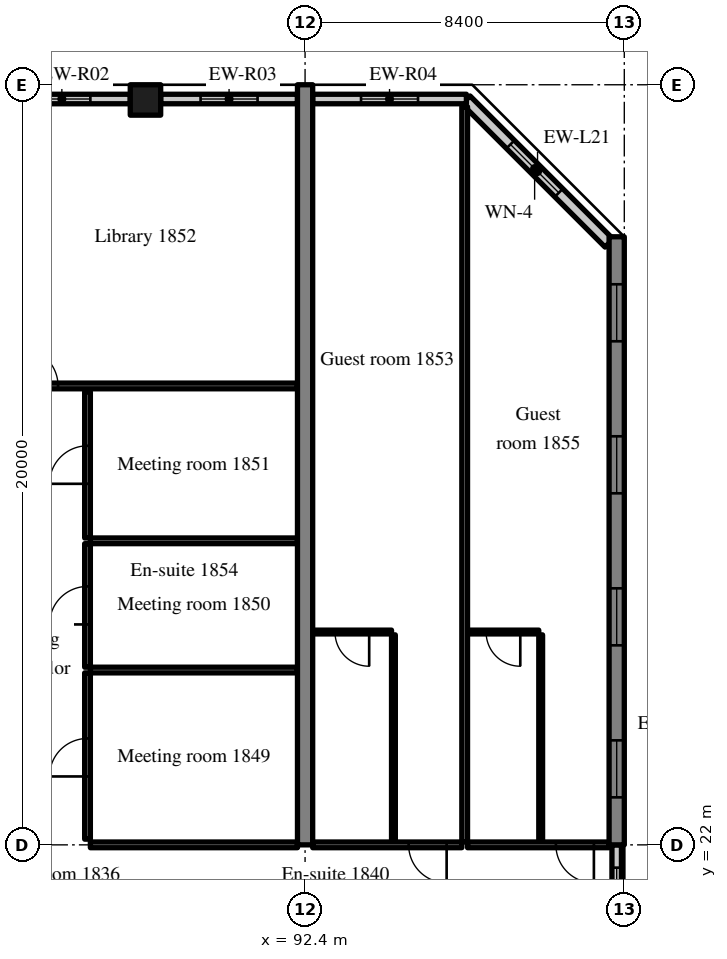
"""IFC4 building model, lengths in metres.
Left out: names, types, materials, properties, quantities, classifications, styles, units other than length and angle.
Written with IfcOpenShell. Run it as: python <this file> out.ifc"""

import sys

from ifc_helpers import new_model, si_unit, direction, frame, frame_2d, origin, origin_2d, place, context, subcontext, project, spatial, rectangle, extrude, source, transform, mapped, element, fill, save


model = new_model("IFC4")
c1 = context("Model", 3, precision=1e-05, world=origin(), true_north=direction((0.0, 1.0)))
c2 = subcontext(c1, "Body", "Model", "MODEL_VIEW")
j1 = project(units=[si_unit("LENGTHUNIT", "METRE"), si_unit("PLANEANGLEUNIT", "RADIAN")], contexts=[c1])
p1 = place(None, origin())
s1 = spatial("IfcSite", under=j1, at=p1, CompositionType="ELEMENT")
p2 = place(p1, origin())
s2 = spatial("IfcBuilding", under=s1, at=p2, CompositionType="ELEMENT")
p3 = place(p2, frame((0.0, 0.0, 77.2)))
s3 = spatial("IfcBuildingStorey", under=s2, at=p3, CompositionType="ELEMENT", Elevation=77.2)
m1 = source(origin(), c2, "Body", "SweptSolid", [
    extrude(rectangle(XDim=20.0, YDim=0.4, at=frame_2d((10.0, 0.0))), origin(), (0.0, 0.0, 1.0), 3.52),
])
p4 = place(p3, frame((92.4, 22.0, 0.0), z_axis=(0.0, 0.0, 1.0), x_axis=(0.0, 1.0, 0.0)))
e1 = element("IfcWall", 1, at=p4, inside=s3, PredefinedType="SHEAR", context=c2, shape_type="MappedRepresentation", body=[
    mapped(m1, transform((0.0, 0.0, 0.0), scale=1.0)),
])
m2 = source(origin(), c2, "Body", "SweptSolid", [
    extrude(rectangle(XDim=16.0, YDim=0.4, at=frame_2d((8.0, 0.0))), origin(), (0.0, 0.0, 1.0), 3.52),
])
p5 = place(p3, frame((100.6, 22.0, 0.0), z_axis=(0.0, 0.0, 1.0), x_axis=(0.0, 1.0, 0.0)))
e2 = element("IfcWall", 2, at=p5, inside=s3, PredefinedType="SHEAR", context=c2, shape_type="MappedRepresentation", body=[
    mapped(m2, transform((0.0, 0.0, 0.0), scale=1.0)),
])
m3 = source(origin(), c2, "Body", "SweptSolid", [
    extrude(rectangle(XDim=1.5, YDim=1.5, at=frame_2d((0.75, 0.75))), frame((0.0, 0.21, 0.0), z_axis=(0.0, -1.0, 0.0), x_axis=(1.0, 0.0, 0.0)), (0.0, 0.0, 1.0), 0.42),
])
p6 = place(p5, frame((1.25, 0.0, 0.9)))
e3 = element("IfcOpeningElement", 3, at=p6, cuts=e2, PredefinedType="OPENING", context=c2, shape_type="MappedRepresentation", body=[
    mapped(m3, transform((0.0, 0.0, 0.0), scale=1.0)),
])
p7 = place(p5, frame((5.25, 0.0, 0.9)))
e4 = element("IfcOpeningElement", 4, at=p7, cuts=e2, PredefinedType="OPENING", context=c2, shape_type="MappedRepresentation", body=[
    mapped(m3, transform((0.0, 0.0, 0.0), scale=1.0)),
])
p8 = place(p5, frame((9.25, 0.0, 0.9)))
e5 = element("IfcOpeningElement", 5, at=p8, cuts=e2, PredefinedType="OPENING", context=c2, shape_type="MappedRepresentation", body=[
    mapped(m3, transform((0.0, 0.0, 0.0), scale=1.0)),
])
p9 = place(p5, frame((13.25, 0.0, 0.9)))
e6 = element("IfcOpeningElement", 6, at=p9, cuts=e2, PredefinedType="OPENING", context=c2, shape_type="MappedRepresentation", body=[
    mapped(m3, transform((0.0, 0.0, 0.0), scale=1.0)),
])
m4 = source(origin(), c2, "Body", "SweptSolid", [
    extrude(rectangle(XDim=0.8, YDim=0.8, at=origin_2d()), origin(), (0.0, 0.0, 1.0), 3.52),
])
p10 = place(p3, frame((88.2, 41.6, 0.0), z_axis=(0.0, 0.0, 1.0), x_axis=(1.0, 0.0, 0.0)))
e7 = element("IfcColumn", 7, at=p10, inside=s3, PredefinedType="COLUMN", context=c2, shape_type="MappedRepresentation", body=[
    mapped(m4, transform((0.0, 0.0, 0.0), scale=1.0)),
])
m5 = source(origin(), c2, "Body", "SweptSolid", [
    extrude(rectangle(XDim=5.326, YDim=0.3, at=frame_2d((2.663, 0.0))), origin(), (0.0, 0.0, 1.0), 3.52),
])
p11 = place(p3, frame((100.4, 37.834, 0.0), z_axis=(0.0, 0.0, 1.0), x_axis=(-0.707083859269, 0.707129702361, 0.0)))
e8 = element("IfcWall", 8, at=p11, inside=s3, PredefinedType="SOLIDWALL", context=c2, shape_type="MappedRepresentation", body=[
    mapped(m5, transform((0.0, 0.0, 0.0), scale=1.0)),
])
m6 = source(origin(), c2, "Body", "SweptSolid", [
    extrude(rectangle(XDim=1.8, YDim=1.5, at=frame_2d((0.9, 0.75))), frame((0.0, 0.16, 0.0), z_axis=(0.0, -1.0, 0.0), x_axis=(1.0, 0.0, 0.0)), (0.0, 0.0, 1.0), 0.32),
])
p12 = place(p11, frame((1.871, 0.0, 0.9)))
e9 = element("IfcOpeningElement", 9, at=p12, cuts=e8, PredefinedType="OPENING", context=c2, shape_type="MappedRepresentation", body=[
    mapped(m6, transform((0.0, 0.0, 0.0), scale=1.0)),
])
m7 = source(origin(), c2, "Body", "SweptSolid", [
    extrude(rectangle(XDim=3.6, YDim=0.25, at=frame_2d((1.8, 0.0))), origin(), (0.0, 0.0, 1.0), 2.82),
])
p13 = place(p3, frame((87.8, 41.625, 0.0), z_axis=(0.0, 0.0, 1.0), x_axis=(-1.0, 0.0, 0.0)))
e10 = element("IfcWall", 10, at=p13, inside=s3, PredefinedType="SOLIDWALL", context=c2, shape_type="MappedRepresentation", body=[
    mapped(m7, transform((0.0, 0.0, 0.0), scale=1.0)),
])
m8 = source(origin(), c2, "Body", "SweptSolid", [
    extrude(rectangle(XDim=1.5, YDim=1.5, at=frame_2d((0.75, 0.75))), frame((0.0, 0.135, 0.0), z_axis=(0.0, -1.0, 0.0), x_axis=(1.0, 0.0, 0.0)), (0.0, 0.0, 1.0), 0.27),
])
p14 = place(p13, frame((1.05, 0.0, 0.9)))
e11 = element("IfcOpeningElement", 11, at=p14, cuts=e10, PredefinedType="OPENING", context=c2, shape_type="MappedRepresentation", body=[
    mapped(m8, transform((0.0, 0.0, 0.0), scale=1.0)),
])
m9 = source(origin(), c2, "Body", "SweptSolid", [
    extrude(rectangle(XDim=3.6, YDim=0.25, at=frame_2d((1.8, 0.0))), origin(), (0.0, 0.0, 1.0), 2.82),
])
p15 = place(p3, frame((92.2, 41.625, 0.0), z_axis=(0.0, 0.0, 1.0), x_axis=(-1.0, 0.0, 0.0)))
e12 = element("IfcWall", 12, at=p15, inside=s3, PredefinedType="SOLIDWALL", context=c2, shape_type="MappedRepresentation", body=[
    mapped(m9, transform((0.0, 0.0, 0.0), scale=1.0)),
])
p16 = place(p15, frame((1.05, 0.0, 0.9)))
e13 = element("IfcOpeningElement", 13, at=p16, cuts=e12, PredefinedType="OPENING", context=c2, shape_type="MappedRepresentation", body=[
    mapped(m8, transform((0.0, 0.0, 0.0), scale=1.0)),
])
m10 = source(origin(), c2, "Body", "SweptSolid", [
    extrude(rectangle(XDim=4.045, YDim=0.25, at=frame_2d((2.022, 0.0))), origin(), (0.0, 0.0, 1.0), 2.82),
])
p17 = place(p3, frame((96.645, 41.625, 0.0), z_axis=(0.0, 0.0, 1.0), x_axis=(-1.0, 0.0, 0.0)))
e14 = element("IfcWall", 14, at=p17, inside=s3, PredefinedType="SOLIDWALL", context=c2, shape_type="MappedRepresentation", body=[
    mapped(m10, transform((0.0, 0.0, 0.0), scale=1.0)),
])
p18 = place(p17, frame((1.272, 0.0, 0.9)))
e15 = element("IfcOpeningElement", 15, at=p18, cuts=e14, PredefinedType="OPENING", context=c2, shape_type="MappedRepresentation", body=[
    mapped(m8, transform((0.0, 0.0, 0.0), scale=1.0)),
])
m11 = source(origin(), c2, "Body", "SweptSolid", [
    extrude(rectangle(XDim=2.4, YDim=0.25, at=frame_2d((1.2, 0.0))), origin(), (0.0, 0.0, 1.0), 2.62),
])
p19 = place(p3, frame((100.6, 19.6, 0.0), z_axis=(0.0, 0.0, 1.0), x_axis=(0.0, 1.0, 0.0)))
e16 = element("IfcWall", 16, at=p19, inside=s3, PredefinedType="SOLIDWALL", context=c2, shape_type="MappedRepresentation", body=[
    mapped(m11, transform((0.0, 0.0, 0.0), scale=1.0)),
])
m12 = source(origin(), c2, "Body", "SweptSolid", [
    extrude(rectangle(XDim=1.2, YDim=1.5, at=frame_2d((0.6, 0.75))), frame((0.0, 0.135, 0.0), z_axis=(0.0, -1.0, 0.0), x_axis=(1.0, 0.0, 0.0)), (0.0, 0.0, 1.0), 0.27),
])
p20 = place(p19, frame((0.6, 0.0, 0.9)))
e17 = element("IfcOpeningElement", 17, at=p20, cuts=e16, PredefinedType="OPENING", context=c2, shape_type="MappedRepresentation", body=[
    mapped(m12, transform((0.0, 0.0, 0.0), scale=1.0)),
])
m13 = source(origin(), c2, "Body", "SweptSolid", [
    extrude(rectangle(XDim=5.45, YDim=0.15, at=frame_2d((2.725, 0.0))), origin(), (0.0, 0.0, 1.0), 2.82),
])
p21 = place(p3, frame((86.75, 22.0, 0.0), z_axis=(0.0, 0.0, 1.0), x_axis=(1.0, 0.0, 0.0)))
e18 = element("IfcWall", 18, at=p21, inside=s3, PredefinedType="PARTITIONING", context=c2, shape_type="MappedRepresentation", body=[
    mapped(m13, transform((0.0, 0.0, 0.0), scale=1.0)),
])
m14 = source(origin(), c2, "Body", "SweptSolid", [
    extrude(rectangle(XDim=4.375, YDim=0.15, at=frame_2d((2.188, 0.0))), origin(), (0.0, 0.0, 1.0), 3.52),
])
p22 = place(p3, frame((86.675, 22.15, 0.0), z_axis=(0.0, 0.0, 1.0), x_axis=(0.0, 1.0, 0.0)))
e19 = element("IfcWall", 19, at=p22, inside=s3, PredefinedType="PARTITIONING", context=c2, shape_type="MappedRepresentation", body=[
    mapped(m14, transform((0.0, 0.0, 0.0), scale=1.0)),
])
m15 = source(origin(), c2, "Body", "SweptSolid", [
    extrude(rectangle(XDim=1.0, YDim=2.1, at=frame_2d((0.5, 1.05))), frame((0.0, 0.085, 0.0), z_axis=(0.0, -1.0, 0.0), x_axis=(1.0, 0.0, 0.0)), (0.0, 0.0, 1.0), 0.17),
])
p23 = place(p22, frame((1.65, 0.0, 0.0)))
e20 = element("IfcOpeningElement", 20, at=p23, cuts=e19, PredefinedType="OPENING", context=c2, shape_type="MappedRepresentation", body=[
    mapped(m15, transform((0.0, 0.0, 0.0), scale=1.0)),
])
m16 = source(origin(), c2, "Body", "SweptSolid", [
    extrude(rectangle(XDim=5.45, YDim=0.15, at=frame_2d((2.725, 0.0))), origin(), (0.0, 0.0, 1.0), 3.52),
])
p24 = place(p3, frame((86.75, 26.6, 0.0), z_axis=(0.0, 0.0, 1.0), x_axis=(1.0, 0.0, 0.0)))
e21 = element("IfcWall", 21, at=p24, inside=s3, PredefinedType="PARTITIONING", context=c2, shape_type="MappedRepresentation", body=[
    mapped(m16, transform((0.0, 0.0, 0.0), scale=1.0)),
])
m17 = source(origin(), c2, "Body", "SweptSolid", [
    extrude(rectangle(XDim=3.25, YDim=0.15, at=frame_2d((1.625, 0.0))), origin(), (0.0, 0.0, 1.0), 3.52),
])
p25 = place(p3, frame((86.675, 26.675, 0.0), z_axis=(0.0, 0.0, 1.0), x_axis=(0.0, 1.0, 0.0)))
e22 = element("IfcWall", 22, at=p25, inside=s3, PredefinedType="PARTITIONING", context=c2, shape_type="MappedRepresentation", body=[
    mapped(m17, transform((0.0, 0.0, 0.0), scale=1.0)),
])
p26 = place(p25, frame((1.125, 0.0, 0.0)))
e23 = element("IfcOpeningElement", 23, at=p26, cuts=e22, PredefinedType="OPENING", context=c2, shape_type="MappedRepresentation", body=[
    mapped(m15, transform((0.0, 0.0, 0.0), scale=1.0)),
])
p27 = place(p3, frame((86.75, 30.0, 0.0), z_axis=(0.0, 0.0, 1.0), x_axis=(1.0, 0.0, 0.0)))
e24 = element("IfcWall", 24, at=p27, inside=s3, PredefinedType="PARTITIONING", context=c2, shape_type="MappedRepresentation", body=[
    mapped(m16, transform((0.0, 0.0, 0.0), scale=1.0)),
])
m18 = source(origin(), c2, "Body", "SweptSolid", [
    extrude(rectangle(XDim=3.85, YDim=0.15, at=frame_2d((1.925, 0.0))), origin(), (0.0, 0.0, 1.0), 3.52),
])
p28 = place(p3, frame((86.675, 30.075, 0.0), z_axis=(0.0, 0.0, 1.0), x_axis=(0.0, 1.0, 0.0)))
e25 = element("IfcWall", 25, at=p28, inside=s3, PredefinedType="PARTITIONING", context=c2, shape_type="MappedRepresentation", body=[
    mapped(m18, transform((0.0, 0.0, 0.0), scale=1.0)),
])
p29 = place(p28, frame((1.425, 0.0, 0.0)))
e26 = element("IfcOpeningElement", 26, at=p29, cuts=e25, PredefinedType="OPENING", context=c2, shape_type="MappedRepresentation", body=[
    mapped(m15, transform((0.0, 0.0, 0.0), scale=1.0)),
])
m19 = source(origin(), c2, "Body", "SweptSolid", [
    extrude(rectangle(XDim=8.0, YDim=0.15, at=frame_2d((4.0, 0.0))), origin(), (0.0, 0.0, 1.0), 3.52),
])
p30 = place(p3, frame((84.2, 34.075, 0.0), z_axis=(0.0, 0.0, 1.0), x_axis=(1.0, 0.0, 0.0)))
e27 = element("IfcWall", 27, at=p30, inside=s3, PredefinedType="PARTITIONING", context=c2, shape_type="MappedRepresentation", body=[
    mapped(m19, transform((0.0, 0.0, 0.0), scale=1.0)),
])
p31 = place(p30, frame((0.7, 0.0, 0.0)))
e28 = element("IfcOpeningElement", 28, at=p31, cuts=e27, PredefinedType="OPENING", context=c2, shape_type="MappedRepresentation", body=[
    mapped(m15, transform((0.0, 0.0, 0.0), scale=1.0)),
])
m20 = source(origin(), c2, "Body", "SweptSolid", [
    extrude(rectangle(XDim=5.45, YDim=0.1, at=frame_2d((2.725, 0.0))), origin(), (0.0, 0.0, 1.0), 3.52),
])
p32 = place(p3, frame((94.725, 22.075, 0.0), z_axis=(0.0, 0.0, 1.0), x_axis=(0.0, 1.0, 0.0)))
e29 = element("IfcWall", 29, at=p32, inside=s3, PredefinedType="PARTITIONING", context=c2, shape_type="MappedRepresentation", body=[
    mapped(m20, transform((0.0, 0.0, 0.0), scale=1.0)),
])
m21 = source(origin(), c2, "Body", "SweptSolid", [
    extrude(rectangle(XDim=2.075, YDim=0.1, at=frame_2d((1.038, 0.0))), origin(), (0.0, 0.0, 1.0), 3.52),
])
p33 = place(p3, frame((92.6, 27.6, 0.0), z_axis=(0.0, 0.0, 1.0), x_axis=(1.0, 0.0, 0.0)))
e30 = element("IfcWall", 30, at=p33, inside=s3, PredefinedType="PARTITIONING", context=c2, shape_type="MappedRepresentation", body=[
    mapped(m21, transform((0.0, 0.0, 0.0), scale=1.0)),
])
m22 = source(origin(), c2, "Body", "SweptSolid", [
    extrude(rectangle(XDim=0.9, YDim=2.1, at=frame_2d((0.45, 1.05))), frame((0.0, 0.06, 0.0), z_axis=(0.0, -1.0, 0.0), x_axis=(1.0, 0.0, 0.0)), (0.0, 0.0, 1.0), 0.12),
])
p34 = place(p33, frame((0.587, 0.0, 0.0)))
e31 = element("IfcOpeningElement", 31, at=p34, cuts=e30, PredefinedType="OPENING", context=c2, shape_type="MappedRepresentation", body=[
    mapped(m22, transform((0.0, 0.0, 0.0), scale=1.0)),
])
m23 = source(origin(), c2, "Body", "SweptSolid", [
    extrude(rectangle(XDim=3.925, YDim=0.15, at=frame_2d((1.962, 0.0))), origin(), (0.0, 0.0, 1.0), 2.82),
])
p35 = place(p3, frame((92.6, 22.0, 0.0), z_axis=(0.0, 0.0, 1.0), x_axis=(1.0, 0.0, 0.0)))
e32 = element("IfcWall", 32, at=p35, inside=s3, PredefinedType="PARTITIONING", context=c2, shape_type="MappedRepresentation", body=[
    mapped(m23, transform((0.0, 0.0, 0.0), scale=1.0)),
])
p36 = place(p35, frame((2.525, 0.0, 0.0)))
e33 = element("IfcOpeningElement", 33, at=p36, cuts=e32, PredefinedType="OPENING", context=c2, shape_type="MappedRepresentation", body=[
    mapped(m15, transform((0.0, 0.0, 0.0), scale=1.0)),
])
p37 = place(p3, frame((98.6, 22.075, 0.0), z_axis=(0.0, 0.0, 1.0), x_axis=(0.0, 1.0, 0.0)))
e34 = element("IfcWall", 34, at=p37, inside=s3, PredefinedType="PARTITIONING", context=c2, shape_type="MappedRepresentation", body=[
    mapped(m20, transform((0.0, 0.0, 0.0), scale=1.0)),
])
m24 = source(origin(), c2, "Body", "SweptSolid", [
    extrude(rectangle(XDim=1.875, YDim=0.1, at=frame_2d((0.938, 0.0))), origin(), (0.0, 0.0, 1.0), 3.52),
])
p38 = place(p3, frame((96.675, 27.6, 0.0), z_axis=(0.0, 0.0, 1.0), x_axis=(1.0, 0.0, 0.0)))
e35 = element("IfcWall", 35, at=p38, inside=s3, PredefinedType="PARTITIONING", context=c2, shape_type="MappedRepresentation", body=[
    mapped(m24, transform((0.0, 0.0, 0.0), scale=1.0)),
])
p39 = place(p38, frame((0.488, 0.0, 0.0)))
e36 = element("IfcOpeningElement", 36, at=p39, cuts=e35, PredefinedType="OPENING", context=c2, shape_type="MappedRepresentation", body=[
    mapped(m22, transform((0.0, 0.0, 0.0), scale=1.0)),
])
m25 = source(origin(), c2, "Body", "SweptSolid", [
    extrude(rectangle(XDim=3.725, YDim=0.15, at=frame_2d((1.862, 0.0))), origin(), (0.0, 0.0, 1.0), 2.82),
])
p40 = place(p3, frame((96.675, 22.0, 0.0), z_axis=(0.0, 0.0, 1.0), x_axis=(1.0, 0.0, 0.0)))
e37 = element("IfcWall", 37, at=p40, inside=s3, PredefinedType="PARTITIONING", context=c2, shape_type="MappedRepresentation", body=[
    mapped(m25, transform((0.0, 0.0, 0.0), scale=1.0)),
])
p41 = place(p40, frame((2.325, 0.0, 0.0)))
e38 = element("IfcOpeningElement", 38, at=p41, cuts=e37, PredefinedType="OPENING", context=c2, shape_type="MappedRepresentation", body=[
    mapped(m15, transform((0.0, 0.0, 0.0), scale=1.0)),
])
m26 = source(origin(), c2, "Body", "SweptSolid", [
    extrude(rectangle(XDim=19.347, YDim=0.15, at=frame_2d((9.674, 0.0))), origin(), (0.0, 0.0, 1.0), 3.52),
])
p42 = place(p3, frame((96.6, 22.075, 0.0), z_axis=(0.0, 0.0, 1.0), x_axis=(0.0, 1.0, 0.0)))
e39 = element("IfcWall", 39, at=p42, inside=s3, PredefinedType="PARTITIONING", context=c2, shape_type="MappedRepresentation", body=[
    mapped(m26, transform((0.0, 0.0, 0.0), scale=1.0)),
])
m27 = source(origin(), c2, "Body", "SweptSolid", [
    extrude(rectangle(XDim=1.8, YDim=1.5, at=frame_2d((0.9, 0.75))), frame((0.0, 0.03, 0.0), z_axis=(0.0, -1.0, 0.0), x_axis=(1.0, 0.0, 0.0)), (0.0, 0.0, 1.0), 0.06),
])
p43 = place(p12, origin())
e40 = element("IfcWindow", 40, at=p43, inside=s3, PartitioningType="SINGLE_PANEL", PredefinedType="WINDOW", context=c2, shape_type="MappedRepresentation", body=[
    mapped(m27, transform((0.0, 0.0, 0.0), scale=1.0)),
])
fill(e9, e40)
m28 = source(origin(), c2, "Body", "SweptSolid", [
    extrude(rectangle(XDim=1.5, YDim=1.5, at=frame_2d((0.75, 0.75))), frame((0.0, 0.03, 0.0), z_axis=(0.0, -1.0, 0.0), x_axis=(1.0, 0.0, 0.0)), (0.0, 0.0, 1.0), 0.06),
])
p44 = place(p14, origin())
e41 = element("IfcWindow", 41, at=p44, inside=s3, PartitioningType="SINGLE_PANEL", PredefinedType="WINDOW", context=c2, shape_type="MappedRepresentation", body=[
    mapped(m28, transform((0.0, 0.0, 0.0), scale=1.0)),
])
fill(e11, e41)
p45 = place(p16, origin())
e42 = element("IfcWindow", 42, at=p45, inside=s3, PartitioningType="SINGLE_PANEL", PredefinedType="WINDOW", context=c2, shape_type="MappedRepresentation", body=[
    mapped(m28, transform((0.0, 0.0, 0.0), scale=1.0)),
])
fill(e13, e42)
p46 = place(p18, origin())
e43 = element("IfcWindow", 43, at=p46, inside=s3, PartitioningType="SINGLE_PANEL", PredefinedType="WINDOW", context=c2, shape_type="MappedRepresentation", body=[
    mapped(m28, transform((0.0, 0.0, 0.0), scale=1.0)),
])
fill(e15, e43)
p47 = place(p6, origin())
e44 = element("IfcWindow", 44, at=p47, inside=s3, PartitioningType="SINGLE_PANEL", PredefinedType="WINDOW", context=c2, shape_type="MappedRepresentation", body=[
    mapped(m28, transform((0.0, 0.0, 0.0), scale=1.0)),
])
fill(e3, e44)
p48 = place(p7, origin())
e45 = element("IfcWindow", 45, at=p48, inside=s3, PartitioningType="SINGLE_PANEL", PredefinedType="WINDOW", context=c2, shape_type="MappedRepresentation", body=[
    mapped(m28, transform((0.0, 0.0, 0.0), scale=1.0)),
])
fill(e4, e45)
p49 = place(p8, origin())
e46 = element("IfcWindow", 46, at=p49, inside=s3, PartitioningType="SINGLE_PANEL", PredefinedType="WINDOW", context=c2, shape_type="MappedRepresentation", body=[
    mapped(m28, transform((0.0, 0.0, 0.0), scale=1.0)),
])
fill(e5, e46)
p50 = place(p9, origin())
e47 = element("IfcWindow", 47, at=p50, inside=s3, PartitioningType="SINGLE_PANEL", PredefinedType="WINDOW", context=c2, shape_type="MappedRepresentation", body=[
    mapped(m28, transform((0.0, 0.0, 0.0), scale=1.0)),
])
fill(e6, e47)
m29 = source(origin(), c2, "Body", "SweptSolid", [
    extrude(rectangle(XDim=1.2, YDim=1.5, at=frame_2d((0.6, 0.75))), frame((0.0, 0.03, 0.0), z_axis=(0.0, -1.0, 0.0), x_axis=(1.0, 0.0, 0.0)), (0.0, 0.0, 1.0), 0.06),
])
p51 = place(p20, origin())
e48 = element("IfcWindow", 48, at=p51, inside=s3, PartitioningType="SINGLE_PANEL", PredefinedType="WINDOW", context=c2, shape_type="MappedRepresentation", body=[
    mapped(m29, transform((0.0, 0.0, 0.0), scale=1.0)),
])
fill(e17, e48)
m30 = source(origin(), c2, "Body", "SweptSolid", [
    extrude(rectangle(XDim=1.0, YDim=2.1, at=frame_2d((0.5, 1.05))), frame((0.0, 0.025, 0.0), z_axis=(0.0, -1.0, 0.0), x_axis=(1.0, 0.0, 0.0)), (0.0, 0.0, 1.0), 0.05),
])
p52 = place(p23, origin())
e49 = element("IfcDoor", 49, at=p52, inside=s3, OperationType="SINGLE_SWING_LEFT", PredefinedType="DOOR", context=c2, shape_type="MappedRepresentation", body=[
    mapped(m30, transform((0.0, 0.0, 0.0), scale=1.0)),
])
fill(e20, e49)
p53 = place(p26, origin())
e50 = element("IfcDoor", 50, at=p53, inside=s3, OperationType="SINGLE_SWING_LEFT", PredefinedType="DOOR", context=c2, shape_type="MappedRepresentation", body=[
    mapped(m30, transform((0.0, 0.0, 0.0), scale=1.0)),
])
fill(e23, e50)
p54 = place(p29, origin())
e51 = element("IfcDoor", 51, at=p54, inside=s3, OperationType="SINGLE_SWING_LEFT", PredefinedType="DOOR", context=c2, shape_type="MappedRepresentation", body=[
    mapped(m30, transform((0.0, 0.0, 0.0), scale=1.0)),
])
fill(e26, e51)
p55 = place(p31, origin())
e52 = element("IfcDoor", 52, at=p55, inside=s3, OperationType="SINGLE_SWING_LEFT", PredefinedType="DOOR", context=c2, shape_type="MappedRepresentation", body=[
    mapped(m30, transform((0.0, 0.0, 0.0), scale=1.0)),
])
fill(e28, e52)
m31 = source(origin(), c2, "Body", "SweptSolid", [
    extrude(rectangle(XDim=0.9, YDim=2.1, at=frame_2d((0.45, 1.05))), frame((0.0, 0.025, 0.0), z_axis=(0.0, -1.0, 0.0), x_axis=(1.0, 0.0, 0.0)), (0.0, 0.0, 1.0), 0.05),
])
p56 = place(p34, origin())
e53 = element("IfcDoor", 53, at=p56, inside=s3, OperationType="SINGLE_SWING_RIGHT", PredefinedType="DOOR", context=c2, shape_type="MappedRepresentation", body=[
    mapped(m31, transform((0.0, 0.0, 0.0), scale=1.0)),
])
fill(e31, e53)
p57 = place(p36, origin())
e54 = element("IfcDoor", 54, at=p57, inside=s3, OperationType="SINGLE_SWING_RIGHT", PredefinedType="DOOR", context=c2, shape_type="MappedRepresentation", body=[
    mapped(m30, transform((0.0, 0.0, 0.0), scale=1.0)),
])
fill(e33, e54)
p58 = place(p39, origin())
e55 = element("IfcDoor", 55, at=p58, inside=s3, OperationType="SINGLE_SWING_RIGHT", PredefinedType="DOOR", context=c2, shape_type="MappedRepresentation", body=[
    mapped(m31, transform((0.0, 0.0, 0.0), scale=1.0)),
])
fill(e36, e55)
p59 = place(p41, origin())
e56 = element("IfcDoor", 56, at=p59, inside=s3, OperationType="SINGLE_SWING_RIGHT", PredefinedType="DOOR", context=c2, shape_type="MappedRepresentation", body=[
    mapped(m30, transform((0.0, 0.0, 0.0), scale=1.0)),
])
fill(e38, e56)
save(model, sys.argv[1])
